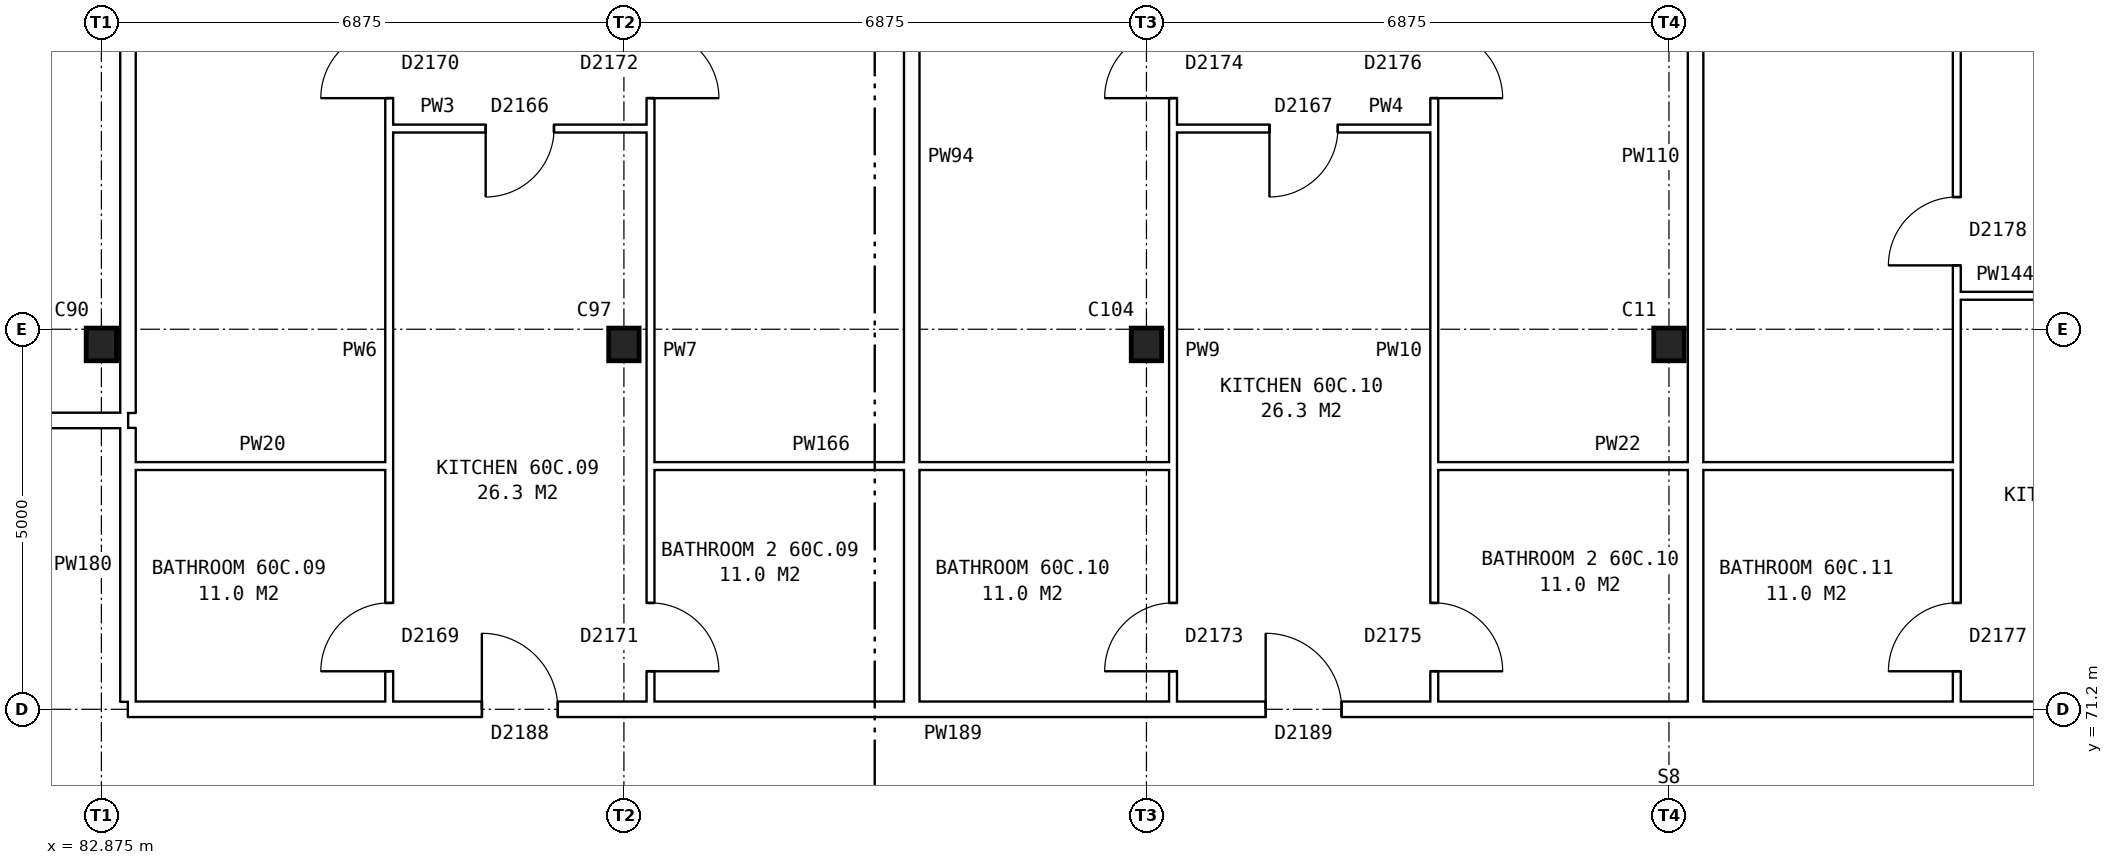
"""IFC4 building model, lengths in metres.
Left out: names, types, materials, properties, quantities, classifications, styles, units other than length and angle.
Written with IfcOpenShell. Run it as: python <this file> out.ifc"""

import sys

from ifc_helpers import new_model, si_unit, direction, frame, frame_2d, origin, origin_2d, place, context, subcontext, project, spatial, rectangle, i_section, extrude, element, fill, save


model = new_model("IFC4")
c1 = context("Model", 3, precision=1e-05, world=origin(), true_north=direction((0.0, 1.0)))
c2 = subcontext(c1, "Body", "Model", "MODEL_VIEW")
j1 = project(units=[si_unit("LENGTHUNIT", "METRE"), si_unit("PLANEANGLEUNIT", "RADIAN")], contexts=[c1])
p1 = place(None, origin())
s1 = spatial("IfcSite", under=j1, at=p1, CompositionType="ELEMENT")
p2 = place(p1, origin())
s2 = spatial("IfcBuilding", under=s1, at=p2, CompositionType="ELEMENT")
p3 = place(p2, frame((0.0, 0.0, 212.1)))
s3 = spatial("IfcBuildingStorey", under=s2, at=p3, CompositionType="ELEMENT", Elevation=212.1)
for number, where, z_axis, x_axis in (
    (1, (82.875, 76.0, 0.0), (0.0, 0.0, 1.0), (1.0, 0.0, 0.0)),
    (2, (89.75, 76.0, 0.0), (0.0, 0.0, 1.0), (1.0, 0.0, 0.0)),
    (3, (96.625, 76.0, 0.0), (0.0, 0.0, 1.0), (1.0, 0.0, 0.0)),
    (4, (103.5, 76.0, 0.0), (0.0, 0.0, 1.0), (1.0, 0.0, 0.0)),
):
    element("IfcColumn", number, at=place(p3, frame(where, z_axis=z_axis, x_axis=x_axis)), inside=s3, PredefinedType="COLUMN", context=c2, shape_type="SweptSolid", body=[
        extrude(i_section(OverallWidth=0.4, OverallDepth=0.43, WebThickness=0.04, FlangeThickness=0.04, at=origin_2d()), origin(), (0.0, 0.0, 1.0), 2.85),
    ])
p4 = place(p3, frame((83.225, 71.2, 0.0), z_axis=(0.0, 0.0, 1.0), x_axis=(1.0, 0.0, 0.0)))
e5 = element("IfcWall", 5, at=p4, inside=s3, PredefinedType="PARTITIONING", context=c2, shape_type="SweptSolid", body=[
    extrude(rectangle(XDim=41.25, YDim=0.2, at=frame_2d((20.625, 0.0))), origin(), (0.0, 0.0, 1.0), 2.85),
])
p5 = place(p4, frame((4.656, 0.0, 0.0)))
e6 = element("IfcOpeningElement", 6, at=p5, cuts=e5, PredefinedType="OPENING", context=c2, shape_type="SweptSolid", body=[
    extrude(rectangle(XDim=1.0, YDim=2.1, at=frame_2d((0.5, 1.05))), frame((0.0, 0.11, 0.0), z_axis=(0.0, -1.0, 0.0), x_axis=(1.0, 0.0, 0.0)), (0.0, 0.0, 1.0), 0.22),
])
p6 = place(p4, frame((14.969, 0.0, 0.0)))
e7 = element("IfcOpeningElement", 7, at=p6, cuts=e5, PredefinedType="OPENING", context=c2, shape_type="SweptSolid", body=[
    extrude(rectangle(XDim=1.0, YDim=2.1, at=frame_2d((0.5, 1.05))), frame((0.0, 0.11, 0.0), z_axis=(0.0, -1.0, 0.0), x_axis=(1.0, 0.0, 0.0)), (0.0, 0.0, 1.0), 0.22),
])
p7 = place(p4, frame((25.281, 0.0, 0.0)))
e8 = element("IfcOpeningElement", 8, at=p7, cuts=e5, PredefinedType="OPENING", context=c2, shape_type="SweptSolid", body=[
    extrude(rectangle(XDim=1.0, YDim=2.1, at=frame_2d((0.5, 1.05))), frame((0.0, 0.11, 0.0), z_axis=(0.0, -1.0, 0.0), x_axis=(1.0, 0.0, 0.0)), (0.0, 0.0, 1.0), 0.22),
])
p8 = place(p4, frame((35.594, 0.0, 0.0)))
e9 = element("IfcOpeningElement", 9, at=p8, cuts=e5, PredefinedType="OPENING", context=c2, shape_type="SweptSolid", body=[
    extrude(rectangle(XDim=1.0, YDim=2.1, at=frame_2d((0.5, 1.05))), frame((0.0, 0.11, 0.0), z_axis=(0.0, -1.0, 0.0), x_axis=(1.0, 0.0, 0.0)), (0.0, 0.0, 1.0), 0.22),
])
p9 = place(p3, frame((83.325, 74.4, 0.0), z_axis=(0.0, 0.0, 1.0), x_axis=(1.0, 0.0, 0.0)))
e10 = element("IfcWall", 10, at=p9, inside=s3, PredefinedType="PARTITIONING", context=c2, shape_type="SweptSolid", body=[
    extrude(rectangle(XDim=3.337, YDim=0.1, at=frame_2d((1.668, 0.0))), origin(), (0.0, 0.0, 1.0), 2.85),
])
for number, where, z_axis, x_axis in (
    (11, (90.1, 74.4, 0.0), (0.0, 0.0, 1.0), (1.0, 0.0, 0.0)),
    (12, (100.412, 74.4, 0.0), (0.0, 0.0, 1.0), (1.0, 0.0, 0.0)),
):
    element("IfcWall", number, at=place(p3, frame(where, z_axis=z_axis, x_axis=x_axis)), inside=s3, PredefinedType="PARTITIONING", context=c2, shape_type="SweptSolid", body=[
        extrude(rectangle(XDim=6.875, YDim=0.1, at=frame_2d((3.438, 0.0))), origin(), (0.0, 0.0, 1.0), 2.85),
    ])
p10 = place(p3, frame((75.64, 75.0, 0.0), z_axis=(0.0, 0.0, 1.0), x_axis=(1.0, 0.0, 0.0)))
e13 = element("IfcWall", 13, at=p10, inside=s3, PredefinedType="PARTITIONING", context=c2, shape_type="SweptSolid", body=[
    extrude(rectangle(XDim=7.585, YDim=0.2, at=frame_2d((3.792, 0.0))), origin(), (0.0, 0.0, 1.0), 2.85),
])
p11 = place(p10, frame((3.343, 0.0, 0.0)))
e14 = element("IfcOpeningElement", 14, at=p11, cuts=e13, PredefinedType="OPENING", context=c2, shape_type="SweptSolid", body=[
    extrude(rectangle(XDim=0.9, YDim=2.1, at=frame_2d((0.45, 1.05))), frame((0.0, 0.11, 0.0), z_axis=(0.0, -1.0, 0.0), x_axis=(1.0, 0.0, 0.0)), (0.0, 0.0, 1.0), 0.22),
])
p12 = place(p3, frame((107.287, 76.64, 0.0), z_axis=(0.0, 0.0, 1.0), x_axis=(1.0, 0.0, 0.0)))
e15 = element("IfcWall", 15, at=p12, inside=s3, PredefinedType="PARTITIONING", context=c2, shape_type="SweptSolid", body=[
    extrude(rectangle(XDim=3.438, YDim=0.1, at=frame_2d((1.719, 0.0))), origin(), (0.0, 0.0, 1.0), 2.85),
])
p13 = place(p12, frame((1.269, 0.0, 0.0)))
e16 = element("IfcOpeningElement", 16, at=p13, cuts=e15, PredefinedType="OPENING", context=c2, shape_type="SweptSolid", body=[
    extrude(rectangle(XDim=0.9, YDim=2.1, at=frame_2d((0.45, 1.05))), frame((0.0, 0.06, 0.0), z_axis=(0.0, -1.0, 0.0), x_axis=(1.0, 0.0, 0.0)), (0.0, 0.0, 1.0), 0.12),
])
p14 = place(p3, frame((86.662, 78.84, 0.0), z_axis=(0.0, 0.0, 1.0), x_axis=(1.0, 0.0, 0.0)))
e17 = element("IfcWall", 17, at=p14, inside=s3, PredefinedType="PARTITIONING", context=c2, shape_type="SweptSolid", body=[
    extrude(rectangle(XDim=3.438, YDim=0.1, at=frame_2d((1.719, 0.0))), origin(), (0.0, 0.0, 1.0), 2.85),
])
p15 = place(p14, frame((1.269, 0.0, 0.0)))
e18 = element("IfcOpeningElement", 18, at=p15, cuts=e17, PredefinedType="OPENING", context=c2, shape_type="SweptSolid", body=[
    extrude(rectangle(XDim=0.9, YDim=2.1, at=frame_2d((0.45, 1.05))), frame((0.0, 0.06, 0.0), z_axis=(0.0, -1.0, 0.0), x_axis=(1.0, 0.0, 0.0)), (0.0, 0.0, 1.0), 0.12),
])
p16 = place(p3, frame((96.975, 78.84, 0.0), z_axis=(0.0, 0.0, 1.0), x_axis=(1.0, 0.0, 0.0)))
e19 = element("IfcWall", 19, at=p16, inside=s3, PredefinedType="PARTITIONING", context=c2, shape_type="SweptSolid", body=[
    extrude(rectangle(XDim=3.437, YDim=0.1, at=frame_2d((1.719, 0.0))), origin(), (0.0, 0.0, 1.0), 2.85),
])
p17 = place(p16, frame((1.269, 0.0, 0.0)))
e20 = element("IfcOpeningElement", 20, at=p17, cuts=e19, PredefinedType="OPENING", context=c2, shape_type="SweptSolid", body=[
    extrude(rectangle(XDim=0.9, YDim=2.1, at=frame_2d((0.45, 1.05))), frame((0.0, 0.06, 0.0), z_axis=(0.0, -1.0, 0.0), x_axis=(1.0, 0.0, 0.0)), (0.0, 0.0, 1.0), 0.12),
])
p18 = place(p3, frame((83.225, 71.3, 0.0), z_axis=(0.0, 0.0, 1.0), x_axis=(0.0, 1.0, 0.0)))
e21 = element("IfcWall", 21, at=p18, inside=s3, PredefinedType="PARTITIONING", context=c2, shape_type="SweptSolid", body=[
    extrude(rectangle(XDim=3.6, YDim=0.2, at=frame_2d((1.8, 0.0))), origin(), (0.0, 0.0, 1.0), 2.85),
])
p19 = place(p3, frame((83.225, 75.1, 0.0), z_axis=(0.0, 0.0, 1.0), x_axis=(0.0, 1.0, 0.0)))
e22 = element("IfcWall", 22, at=p19, inside=s3, PredefinedType="PARTITIONING", context=c2, shape_type="SweptSolid", body=[
    extrude(rectangle(XDim=10.54, YDim=0.2, at=frame_2d((5.27, 0.0))), origin(), (0.0, 0.0, 1.0), 2.85),
])
p20 = place(p3, frame((86.662, 71.3, 0.0), z_axis=(0.0, 0.0, 1.0), x_axis=(0.0, 1.0, 0.0)))
e23 = element("IfcWall", 23, at=p20, inside=s3, PredefinedType="PARTITIONING", context=c2, shape_type="SweptSolid", body=[
    extrude(rectangle(XDim=14.34, YDim=0.1, at=frame_2d((7.17, 0.0))), origin(), (0.0, 0.0, 1.0), 2.85),
])
p21 = place(p20, frame((7.94, 0.0, 0.0)))
e24 = element("IfcOpeningElement", 24, at=p21, cuts=e23, PredefinedType="OPENING", context=c2, shape_type="SweptSolid", body=[
    extrude(rectangle(XDim=0.9, YDim=2.1, at=frame_2d((0.45, 1.05))), frame((0.0, 0.06, 0.0), z_axis=(0.0, -1.0, 0.0), x_axis=(1.0, 0.0, 0.0)), (0.0, 0.0, 1.0), 0.12),
])
p22 = place(p20, frame((0.4, 0.0, 0.0)))
e25 = element("IfcOpeningElement", 25, at=p22, cuts=e23, PredefinedType="OPENING", context=c2, shape_type="SweptSolid", body=[
    extrude(rectangle(XDim=0.9, YDim=2.1, at=frame_2d((0.45, 1.05))), frame((0.0, 0.06, 0.0), z_axis=(0.0, -1.0, 0.0), x_axis=(1.0, 0.0, 0.0)), (0.0, 0.0, 1.0), 0.12),
])
p23 = place(p3, frame((90.1, 71.3, 0.0), z_axis=(0.0, 0.0, 1.0), x_axis=(0.0, 1.0, 0.0)))
e26 = element("IfcWall", 26, at=p23, inside=s3, PredefinedType="PARTITIONING", context=c2, shape_type="SweptSolid", body=[
    extrude(rectangle(XDim=14.34, YDim=0.1, at=frame_2d((7.17, 0.0))), origin(), (0.0, 0.0, 1.0), 2.85),
])
p24 = place(p23, frame((7.94, 0.0, 0.0)))
e27 = element("IfcOpeningElement", 27, at=p24, cuts=e26, PredefinedType="OPENING", context=c2, shape_type="SweptSolid", body=[
    extrude(rectangle(XDim=0.9, YDim=2.1, at=frame_2d((0.45, 1.05))), frame((0.0, 0.06, 0.0), z_axis=(0.0, -1.0, 0.0), x_axis=(1.0, 0.0, 0.0)), (0.0, 0.0, 1.0), 0.12),
])
p25 = place(p23, frame((0.4, 0.0, 0.0)))
e28 = element("IfcOpeningElement", 28, at=p25, cuts=e26, PredefinedType="OPENING", context=c2, shape_type="SweptSolid", body=[
    extrude(rectangle(XDim=0.9, YDim=2.1, at=frame_2d((0.45, 1.05))), frame((0.0, 0.06, 0.0), z_axis=(0.0, -1.0, 0.0), x_axis=(1.0, 0.0, 0.0)), (0.0, 0.0, 1.0), 0.12),
])
p26 = place(p3, frame((93.537, 71.3, 0.0), z_axis=(0.0, 0.0, 1.0), x_axis=(0.0, 1.0, 0.0)))
e29 = element("IfcWall", 29, at=p26, inside=s3, PredefinedType="PARTITIONING", context=c2, shape_type="SweptSolid", body=[
    extrude(rectangle(XDim=14.34, YDim=0.2, at=frame_2d((7.17, 0.0))), origin(), (0.0, 0.0, 1.0), 2.85),
])
p27 = place(p3, frame((96.975, 71.3, 0.0), z_axis=(0.0, 0.0, 1.0), x_axis=(0.0, 1.0, 0.0)))
e30 = element("IfcWall", 30, at=p27, inside=s3, PredefinedType="PARTITIONING", context=c2, shape_type="SweptSolid", body=[
    extrude(rectangle(XDim=14.34, YDim=0.1, at=frame_2d((7.17, 0.0))), origin(), (0.0, 0.0, 1.0), 2.85),
])
p28 = place(p27, frame((7.94, 0.0, 0.0)))
e31 = element("IfcOpeningElement", 31, at=p28, cuts=e30, PredefinedType="OPENING", context=c2, shape_type="SweptSolid", body=[
    extrude(rectangle(XDim=0.9, YDim=2.1, at=frame_2d((0.45, 1.05))), frame((0.0, 0.06, 0.0), z_axis=(0.0, -1.0, 0.0), x_axis=(1.0, 0.0, 0.0)), (0.0, 0.0, 1.0), 0.12),
])
p29 = place(p27, frame((0.4, 0.0, 0.0)))
e32 = element("IfcOpeningElement", 32, at=p29, cuts=e30, PredefinedType="OPENING", context=c2, shape_type="SweptSolid", body=[
    extrude(rectangle(XDim=0.9, YDim=2.1, at=frame_2d((0.45, 1.05))), frame((0.0, 0.06, 0.0), z_axis=(0.0, -1.0, 0.0), x_axis=(1.0, 0.0, 0.0)), (0.0, 0.0, 1.0), 0.12),
])
p30 = place(p3, frame((100.412, 71.3, 0.0), z_axis=(0.0, 0.0, 1.0), x_axis=(0.0, 1.0, 0.0)))
e33 = element("IfcWall", 33, at=p30, inside=s3, PredefinedType="PARTITIONING", context=c2, shape_type="SweptSolid", body=[
    extrude(rectangle(XDim=14.34, YDim=0.1, at=frame_2d((7.17, 0.0))), origin(), (0.0, 0.0, 1.0), 2.85),
])
p31 = place(p30, frame((7.94, 0.0, 0.0)))
e34 = element("IfcOpeningElement", 34, at=p31, cuts=e33, PredefinedType="OPENING", context=c2, shape_type="SweptSolid", body=[
    extrude(rectangle(XDim=0.9, YDim=2.1, at=frame_2d((0.45, 1.05))), frame((0.0, 0.06, 0.0), z_axis=(0.0, -1.0, 0.0), x_axis=(1.0, 0.0, 0.0)), (0.0, 0.0, 1.0), 0.12),
])
p32 = place(p30, frame((0.4, 0.0, 0.0)))
e35 = element("IfcOpeningElement", 35, at=p32, cuts=e33, PredefinedType="OPENING", context=c2, shape_type="SweptSolid", body=[
    extrude(rectangle(XDim=0.9, YDim=2.1, at=frame_2d((0.45, 1.05))), frame((0.0, 0.06, 0.0), z_axis=(0.0, -1.0, 0.0), x_axis=(1.0, 0.0, 0.0)), (0.0, 0.0, 1.0), 0.12),
])
p33 = place(p3, frame((103.85, 71.3, 0.0), z_axis=(0.0, 0.0, 1.0), x_axis=(0.0, 1.0, 0.0)))
e36 = element("IfcWall", 36, at=p33, inside=s3, PredefinedType="PARTITIONING", context=c2, shape_type="SweptSolid", body=[
    extrude(rectangle(XDim=14.34, YDim=0.2, at=frame_2d((7.17, 0.0))), origin(), (0.0, 0.0, 1.0), 2.85),
])
p34 = place(p3, frame((107.287, 71.3, 0.0), z_axis=(0.0, 0.0, 1.0), x_axis=(0.0, 1.0, 0.0)))
e37 = element("IfcWall", 37, at=p34, inside=s3, PredefinedType="PARTITIONING", context=c2, shape_type="SweptSolid", body=[
    extrude(rectangle(XDim=14.34, YDim=0.1, at=frame_2d((7.17, 0.0))), origin(), (0.0, 0.0, 1.0), 2.85),
])
p35 = place(p34, frame((5.74, 0.0, 0.0)))
e38 = element("IfcOpeningElement", 38, at=p35, cuts=e37, PredefinedType="OPENING", context=c2, shape_type="SweptSolid", body=[
    extrude(rectangle(XDim=0.9, YDim=2.1, at=frame_2d((0.45, 1.05))), frame((0.0, 0.06, 0.0), z_axis=(0.0, -1.0, 0.0), x_axis=(1.0, 0.0, 0.0)), (0.0, 0.0, 1.0), 0.12),
])
p36 = place(p34, frame((0.4, 0.0, 0.0)))
e39 = element("IfcOpeningElement", 39, at=p36, cuts=e37, PredefinedType="OPENING", context=c2, shape_type="SweptSolid", body=[
    extrude(rectangle(XDim=0.9, YDim=2.1, at=frame_2d((0.45, 1.05))), frame((0.0, 0.06, 0.0), z_axis=(0.0, -1.0, 0.0), x_axis=(1.0, 0.0, 0.0)), (0.0, 0.0, 1.0), 0.12),
])
p37 = place(p21, origin())
e40 = element("IfcDoor", 40, at=p37, inside=s3, OperationType="SINGLE_SWING_LEFT", PredefinedType="DOOR", context=c2, shape_type="SweptSolid", body=[
    extrude(rectangle(XDim=0.9, YDim=2.1, at=frame_2d((0.45, 1.05))), frame((0.0, 0.025, 0.0), z_axis=(0.0, -1.0, 0.0), x_axis=(1.0, 0.0, 0.0)), (0.0, 0.0, 1.0), 0.05),
])
fill(e24, e40)
p38 = place(p24, frame((0.9, 0.0, 0.0), z_axis=(0.0, 0.0, 1.0), x_axis=(-1.0, 0.0, 0.0)))
e41 = element("IfcDoor", 41, at=p38, inside=s3, OperationType="SINGLE_SWING_RIGHT", PredefinedType="DOOR", context=c2, shape_type="SweptSolid", body=[
    extrude(rectangle(XDim=0.9, YDim=2.1, at=frame_2d((0.45, 1.05))), frame((0.0, 0.025, 0.0), z_axis=(0.0, -1.0, 0.0), x_axis=(1.0, 0.0, 0.0)), (0.0, 0.0, 1.0), 0.05),
])
fill(e27, e41)
p39 = place(p5, origin())
e42 = element("IfcDoor", 42, at=p39, inside=s3, OperationType="SINGLE_SWING_LEFT", PredefinedType="DOOR", context=c2, shape_type="SweptSolid", body=[
    extrude(rectangle(XDim=1.0, YDim=2.1, at=frame_2d((0.5, 1.05))), frame((0.0, 0.025, 0.0), z_axis=(0.0, -1.0, 0.0), x_axis=(1.0, 0.0, 0.0)), (0.0, 0.0, 1.0), 0.05),
])
fill(e6, e42)
p40 = place(p15, frame((0.9, 0.0, 0.0), z_axis=(0.0, 0.0, 1.0), x_axis=(-1.0, 0.0, 0.0)))
e43 = element("IfcDoor", 43, at=p40, inside=s3, OperationType="SINGLE_SWING_RIGHT", PredefinedType="DOOR", context=c2, shape_type="SweptSolid", body=[
    extrude(rectangle(XDim=0.9, YDim=2.1, at=frame_2d((0.45, 1.05))), frame((0.0, 0.025, 0.0), z_axis=(0.0, -1.0, 0.0), x_axis=(1.0, 0.0, 0.0)), (0.0, 0.0, 1.0), 0.05),
])
fill(e18, e43)
p41 = place(p22, origin())
e44 = element("IfcDoor", 44, at=p41, inside=s3, OperationType="SINGLE_SWING_LEFT", PredefinedType="DOOR", context=c2, shape_type="SweptSolid", body=[
    extrude(rectangle(XDim=0.9, YDim=2.1, at=frame_2d((0.45, 1.05))), frame((0.0, 0.025, 0.0), z_axis=(0.0, -1.0, 0.0), x_axis=(1.0, 0.0, 0.0)), (0.0, 0.0, 1.0), 0.05),
])
fill(e25, e44)
p42 = place(p25, frame((0.9, 0.0, 0.0), z_axis=(0.0, 0.0, 1.0), x_axis=(-1.0, 0.0, 0.0)))
e45 = element("IfcDoor", 45, at=p42, inside=s3, OperationType="SINGLE_SWING_RIGHT", PredefinedType="DOOR", context=c2, shape_type="SweptSolid", body=[
    extrude(rectangle(XDim=0.9, YDim=2.1, at=frame_2d((0.45, 1.05))), frame((0.0, 0.025, 0.0), z_axis=(0.0, -1.0, 0.0), x_axis=(1.0, 0.0, 0.0)), (0.0, 0.0, 1.0), 0.05),
])
fill(e28, e45)
p43 = place(p28, origin())
e46 = element("IfcDoor", 46, at=p43, inside=s3, OperationType="SINGLE_SWING_LEFT", PredefinedType="DOOR", context=c2, shape_type="SweptSolid", body=[
    extrude(rectangle(XDim=0.9, YDim=2.1, at=frame_2d((0.45, 1.05))), frame((0.0, 0.025, 0.0), z_axis=(0.0, -1.0, 0.0), x_axis=(1.0, 0.0, 0.0)), (0.0, 0.0, 1.0), 0.05),
])
fill(e31, e46)
p44 = place(p31, frame((0.9, 0.0, 0.0), z_axis=(0.0, 0.0, 1.0), x_axis=(-1.0, 0.0, 0.0)))
e47 = element("IfcDoor", 47, at=p44, inside=s3, OperationType="SINGLE_SWING_RIGHT", PredefinedType="DOOR", context=c2, shape_type="SweptSolid", body=[
    extrude(rectangle(XDim=0.9, YDim=2.1, at=frame_2d((0.45, 1.05))), frame((0.0, 0.025, 0.0), z_axis=(0.0, -1.0, 0.0), x_axis=(1.0, 0.0, 0.0)), (0.0, 0.0, 1.0), 0.05),
])
fill(e34, e47)
p45 = place(p6, origin())
e48 = element("IfcDoor", 48, at=p45, inside=s3, OperationType="SINGLE_SWING_LEFT", PredefinedType="DOOR", context=c2, shape_type="SweptSolid", body=[
    extrude(rectangle(XDim=1.0, YDim=2.1, at=frame_2d((0.5, 1.05))), frame((0.0, 0.025, 0.0), z_axis=(0.0, -1.0, 0.0), x_axis=(1.0, 0.0, 0.0)), (0.0, 0.0, 1.0), 0.05),
])
fill(e7, e48)
p46 = place(p17, frame((0.9, 0.0, 0.0), z_axis=(0.0, 0.0, 1.0), x_axis=(-1.0, 0.0, 0.0)))
e49 = element("IfcDoor", 49, at=p46, inside=s3, OperationType="SINGLE_SWING_RIGHT", PredefinedType="DOOR", context=c2, shape_type="SweptSolid", body=[
    extrude(rectangle(XDim=0.9, YDim=2.1, at=frame_2d((0.45, 1.05))), frame((0.0, 0.025, 0.0), z_axis=(0.0, -1.0, 0.0), x_axis=(1.0, 0.0, 0.0)), (0.0, 0.0, 1.0), 0.05),
])
fill(e20, e49)
p47 = place(p29, origin())
e50 = element("IfcDoor", 50, at=p47, inside=s3, OperationType="SINGLE_SWING_LEFT", PredefinedType="DOOR", context=c2, shape_type="SweptSolid", body=[
    extrude(rectangle(XDim=0.9, YDim=2.1, at=frame_2d((0.45, 1.05))), frame((0.0, 0.025, 0.0), z_axis=(0.0, -1.0, 0.0), x_axis=(1.0, 0.0, 0.0)), (0.0, 0.0, 1.0), 0.05),
])
fill(e32, e50)
p48 = place(p32, frame((0.9, 0.0, 0.0), z_axis=(0.0, 0.0, 1.0), x_axis=(-1.0, 0.0, 0.0)))
e51 = element("IfcDoor", 51, at=p48, inside=s3, OperationType="SINGLE_SWING_RIGHT", PredefinedType="DOOR", context=c2, shape_type="SweptSolid", body=[
    extrude(rectangle(XDim=0.9, YDim=2.1, at=frame_2d((0.45, 1.05))), frame((0.0, 0.025, 0.0), z_axis=(0.0, -1.0, 0.0), x_axis=(1.0, 0.0, 0.0)), (0.0, 0.0, 1.0), 0.05),
])
fill(e35, e51)
p49 = place(p35, origin())
e52 = element("IfcDoor", 52, at=p49, inside=s3, OperationType="SINGLE_SWING_LEFT", PredefinedType="DOOR", context=c2, shape_type="SweptSolid", body=[
    extrude(rectangle(XDim=0.9, YDim=2.1, at=frame_2d((0.45, 1.05))), frame((0.0, 0.025, 0.0), z_axis=(0.0, -1.0, 0.0), x_axis=(1.0, 0.0, 0.0)), (0.0, 0.0, 1.0), 0.05),
])
fill(e38, e52)
p50 = place(p36, origin())
e53 = element("IfcDoor", 53, at=p50, inside=s3, OperationType="SINGLE_SWING_LEFT", PredefinedType="DOOR", context=c2, shape_type="SweptSolid", body=[
    extrude(rectangle(XDim=0.9, YDim=2.1, at=frame_2d((0.45, 1.05))), frame((0.0, 0.025, 0.0), z_axis=(0.0, -1.0, 0.0), x_axis=(1.0, 0.0, 0.0)), (0.0, 0.0, 1.0), 0.05),
])
fill(e39, e53)
save(model, sys.argv[1])
